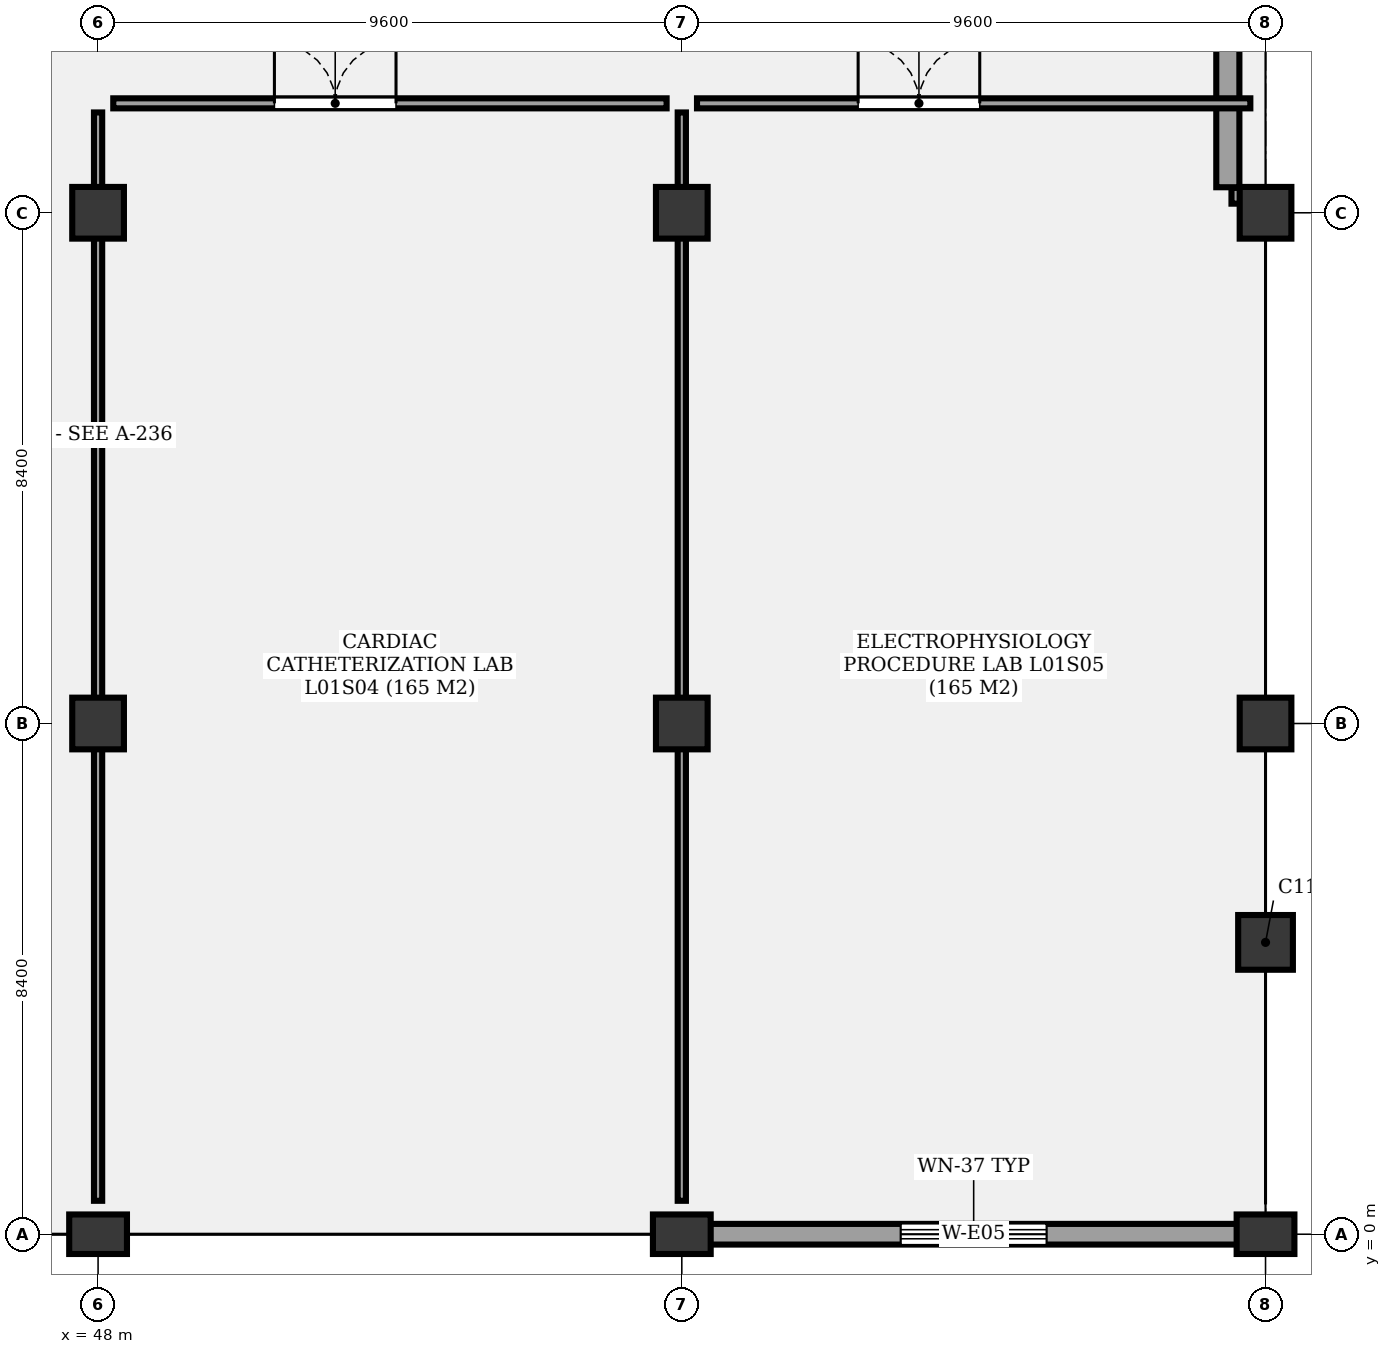
"""IFC4 building model, lengths in metres.
Left out: names, types, materials, properties, quantities, classifications, styles, units other than length and angle.
Written with IfcOpenShell. Run it as: python <this file> out.ifc"""

import sys

from ifc_helpers import new_model, si_unit, direction, frame, frame_2d, origin, origin_2d, place, context, subcontext, project, spatial, rectangle, circle, extrude, element, fill, save


model = new_model("IFC4")
c1 = context("Model", 3, precision=1e-05, world=origin(), true_north=direction((0.0, 1.0)))
c2 = subcontext(c1, "Body", "Model", "MODEL_VIEW")
j1 = project(units=[si_unit("LENGTHUNIT", "METRE"), si_unit("PLANEANGLEUNIT", "RADIAN")], contexts=[c1])
p1 = place(None, origin())
s1 = spatial("IfcSite", under=j1, at=p1, CompositionType="ELEMENT")
p2 = place(p1, origin())
s2 = spatial("IfcBuilding", under=s1, at=p2, CompositionType="ELEMENT")
p3 = place(p2, frame((0.0, 0.0, 5.1)))
s3 = spatial("IfcBuildingStorey", under=s2, at=p3, CompositionType="ELEMENT", Elevation=5.1)
p4 = place(p3, frame((48.0, 0.0, 0.0), z_axis=(0.0, 0.0, 1.0), x_axis=(0.0, 1.0, 0.0)))
e1 = element("IfcColumn", 1, at=p4, inside=s3, PredefinedType="COLUMN", context=c2, shape_type="SweptSolid", body=[
    extrude(rectangle(XDim=0.95, YDim=0.65, at=origin_2d()), origin(), (0.0, 0.0, 1.0), 4.8),
])
for number, where, z_axis, x_axis in (
    (2, (48.0, 8.4, 0.0), (0.0, 0.0, 1.0), (1.0, 0.0, 0.0)),
    (3, (48.0, 16.8, 0.0), (0.0, 0.0, 1.0), (1.0, 0.0, 0.0)),
):
    element("IfcColumn", number, at=place(p3, frame(where, z_axis=z_axis, x_axis=x_axis)), inside=s3, PredefinedType="COLUMN", context=c2, shape_type="SweptSolid", body=[
        extrude(rectangle(XDim=0.85, YDim=0.85, at=origin_2d()), origin(), (0.0, 0.0, 1.0), 4.8),
    ])
p5 = place(p3, frame((57.6, 0.0, 0.0), z_axis=(0.0, 0.0, 1.0), x_axis=(0.0, 1.0, 0.0)))
e4 = element("IfcColumn", 4, at=p5, inside=s3, PredefinedType="COLUMN", context=c2, shape_type="SweptSolid", body=[
    extrude(rectangle(XDim=0.95, YDim=0.65, at=origin_2d()), origin(), (0.0, 0.0, 1.0), 4.8),
])
for number, where, z_axis, x_axis in (
    (5, (57.6, 8.4, 0.0), (0.0, 0.0, 1.0), (1.0, 0.0, 0.0)),
    (6, (57.6, 16.8, 0.0), (0.0, 0.0, 1.0), (1.0, 0.0, 0.0)),
):
    element("IfcColumn", number, at=place(p3, frame(where, z_axis=z_axis, x_axis=x_axis)), inside=s3, PredefinedType="COLUMN", context=c2, shape_type="SweptSolid", body=[
        extrude(rectangle(XDim=0.85, YDim=0.85, at=origin_2d()), origin(), (0.0, 0.0, 1.0), 4.8),
    ])
p6 = place(p3, frame((67.2, 0.0, 0.0), z_axis=(0.0, 0.0, 1.0), x_axis=(0.0, 1.0, 0.0)))
e7 = element("IfcColumn", 7, at=p6, inside=s3, PredefinedType="COLUMN", context=c2, shape_type="SweptSolid", body=[
    extrude(rectangle(XDim=0.95, YDim=0.65, at=origin_2d()), origin(), (0.0, 0.0, 1.0), 4.8),
])
p7 = place(p3, frame((67.2, 4.8, 0.0), z_axis=(0.0, 0.0, 1.0), x_axis=(1.0, 0.0, 0.0)))
e8 = element("IfcColumn", 8, at=p7, inside=s3, PredefinedType="COLUMN", context=c2, shape_type="SweptSolid", body=[
    extrude(circle(Radius=0.45, at=origin_2d()), origin(), (0.0, 0.0, 1.0), 4.8),
])
for number, where, z_axis, x_axis in (
    (9, (67.2, 8.4, 0.0), (0.0, 0.0, 1.0), (1.0, 0.0, 0.0)),
    (10, (67.2, 16.8, 0.0), (0.0, 0.0, 1.0), (1.0, 0.0, 0.0)),
):
    element("IfcColumn", number, at=place(p3, frame(where, z_axis=z_axis, x_axis=x_axis)), inside=s3, PredefinedType="COLUMN", context=c2, shape_type="SweptSolid", body=[
        extrude(rectangle(XDim=0.85, YDim=0.85, at=origin_2d()), origin(), (0.0, 0.0, 1.0), 4.8),
    ])
p8 = place(p3, frame((67.2, 0.0, 0.0), z_axis=(0.0, 0.0, 1.0), x_axis=(-1.0, 0.0, 0.0)))
e11 = element("IfcWall", 11, at=p8, inside=s3, PredefinedType="SOLIDWALL", context=c2, shape_type="SweptSolid", body=[
    extrude(rectangle(XDim=9.6, YDim=0.34, at=frame_2d((4.8, 0.0))), origin(), (0.0, 0.0, 1.0), 3.94),
])
p9 = place(p8, frame((3.6, 0.0, 0.85)))
e12 = element("IfcOpeningElement", 12, at=p9, cuts=e11, PredefinedType="OPENING", context=c2, shape_type="SweptSolid", body=[
    extrude(rectangle(XDim=2.4, YDim=1.6, at=frame_2d((1.2, 0.8))), frame((0.0, 0.18, 0.0), z_axis=(0.0, -1.0, 0.0), x_axis=(1.0, 0.0, 0.0)), (0.0, 0.0, 1.0), 0.36),
])
p10 = place(p3, frame((67.0, 17.08, 0.0), z_axis=(0.0, 0.0, 1.0), x_axis=(-1.0, 0.0, 0.0)))
e13 = element("IfcWall", 13, at=p10, inside=s3, PredefinedType="SOLIDWALL", context=c2, shape_type="SweptSolid", body=[
    extrude(rectangle(XDim=0.36, YDim=0.26, at=frame_2d((0.18, 0.0))), origin(), (0.0, 0.0, 1.0), 3.94),
])
p11 = place(p3, frame((66.58, 24.62, 0.0), z_axis=(0.0, 0.0, 1.0), x_axis=(0.0, -1.0, 0.0)))
e14 = element("IfcWall", 14, at=p11, inside=s3, PredefinedType="SOLIDWALL", context=c2, shape_type="SweptSolid", body=[
    extrude(rectangle(XDim=7.4, YDim=0.38, at=frame_2d((3.7, 0.0))), origin(), (0.0, 0.0, 1.0), 3.94),
])
p12 = place(p3, frame((48.25, 18.6, 0.0), z_axis=(0.0, 0.0, 1.0), x_axis=(1.0, 0.0, 0.0)))
e15 = element("IfcWall", 15, at=p12, inside=s3, PredefinedType="PARTITIONING", context=c2, shape_type="SweptSolid", body=[
    extrude(rectangle(XDim=9.1, YDim=0.165, at=frame_2d((4.55, 0.0))), origin(), (0.0, 0.0, 1.0), 3.68),
])
p13 = place(p12, frame((2.65, 0.0, 0.0)))
e16 = element("IfcOpeningElement", 16, at=p13, cuts=e15, PredefinedType="OPENING", context=c2, shape_type="SweptSolid", body=[
    extrude(rectangle(XDim=2.0, YDim=2.4, at=frame_2d((1.0, 1.2))), frame((0.0, 0.093, 0.0), z_axis=(0.0, -1.0, 0.0), x_axis=(1.0, 0.0, 0.0)), (0.0, 0.0, 1.0), 0.185),
])
p14 = place(p3, frame((48.0, 0.55, 0.0), z_axis=(0.0, 0.0, 1.0), x_axis=(0.0, 1.0, 0.0)))
e17 = element("IfcWall", 17, at=p14, inside=s3, PredefinedType="PARTITIONING", context=c2, shape_type="SweptSolid", body=[
    extrude(rectangle(XDim=17.9, YDim=0.135, at=frame_2d((8.95, 0.0))), origin(), (0.0, 0.0, 1.0), 3.68),
])
p15 = place(p3, frame((57.85, 18.6, 0.0), z_axis=(0.0, 0.0, 1.0), x_axis=(1.0, 0.0, 0.0)))
e18 = element("IfcWall", 18, at=p15, inside=s3, PredefinedType="PARTITIONING", context=c2, shape_type="SweptSolid", body=[
    extrude(rectangle(XDim=9.1, YDim=0.165, at=frame_2d((4.55, 0.0))), origin(), (0.0, 0.0, 1.0), 3.68),
])
p16 = place(p15, frame((2.65, 0.0, 0.0)))
e19 = element("IfcOpeningElement", 19, at=p16, cuts=e18, PredefinedType="OPENING", context=c2, shape_type="SweptSolid", body=[
    extrude(rectangle(XDim=2.0, YDim=2.4, at=frame_2d((1.0, 1.2))), frame((0.0, 0.093, 0.0), z_axis=(0.0, -1.0, 0.0), x_axis=(1.0, 0.0, 0.0)), (0.0, 0.0, 1.0), 0.185),
])
p17 = place(p3, frame((57.6, 0.55, 0.0), z_axis=(0.0, 0.0, 1.0), x_axis=(0.0, 1.0, 0.0)))
e20 = element("IfcWall", 20, at=p17, inside=s3, PredefinedType="PARTITIONING", context=c2, shape_type="SweptSolid", body=[
    extrude(rectangle(XDim=17.9, YDim=0.135, at=frame_2d((8.95, 0.0))), origin(), (0.0, 0.0, 1.0), 3.68),
])
p18 = place(p9, origin())
e21 = element("IfcWindow", 21, at=p18, inside=s3, PartitioningType="SINGLE_PANEL", PredefinedType="WINDOW", context=c2, shape_type="SweptSolid", body=[
    extrude(rectangle(XDim=2.4, YDim=1.6, at=frame_2d((1.2, 0.8))), frame((0.0, 0.03, 0.0), z_axis=(0.0, -1.0, 0.0), x_axis=(1.0, 0.0, 0.0)), (0.0, 0.0, 1.0), 0.06),
])
fill(e12, e21)
p19 = place(p13, origin())
e22 = element("IfcDoor", 22, at=p19, inside=s3, OperationType="DOUBLE_DOOR_SINGLE_SWING", PredefinedType="DOOR", context=c2, shape_type="SweptSolid", body=[
    extrude(rectangle(XDim=2.0, YDim=2.4, at=frame_2d((1.0, 1.2))), frame((0.0, 0.025, 0.0), z_axis=(0.0, -1.0, 0.0), x_axis=(1.0, 0.0, 0.0)), (0.0, 0.0, 1.0), 0.05),
])
fill(e16, e22)
p20 = place(p16, origin())
e23 = element("IfcDoor", 23, at=p20, inside=s3, OperationType="DOUBLE_DOOR_SINGLE_SWING", PredefinedType="DOOR", context=c2, shape_type="SweptSolid", body=[
    extrude(rectangle(XDim=2.0, YDim=2.4, at=frame_2d((1.0, 1.2))), frame((0.0, 0.025, 0.0), z_axis=(0.0, -1.0, 0.0), x_axis=(1.0, 0.0, 0.0)), (0.0, 0.0, 1.0), 0.05),
])
fill(e19, e23)
save(model, sys.argv[1])
